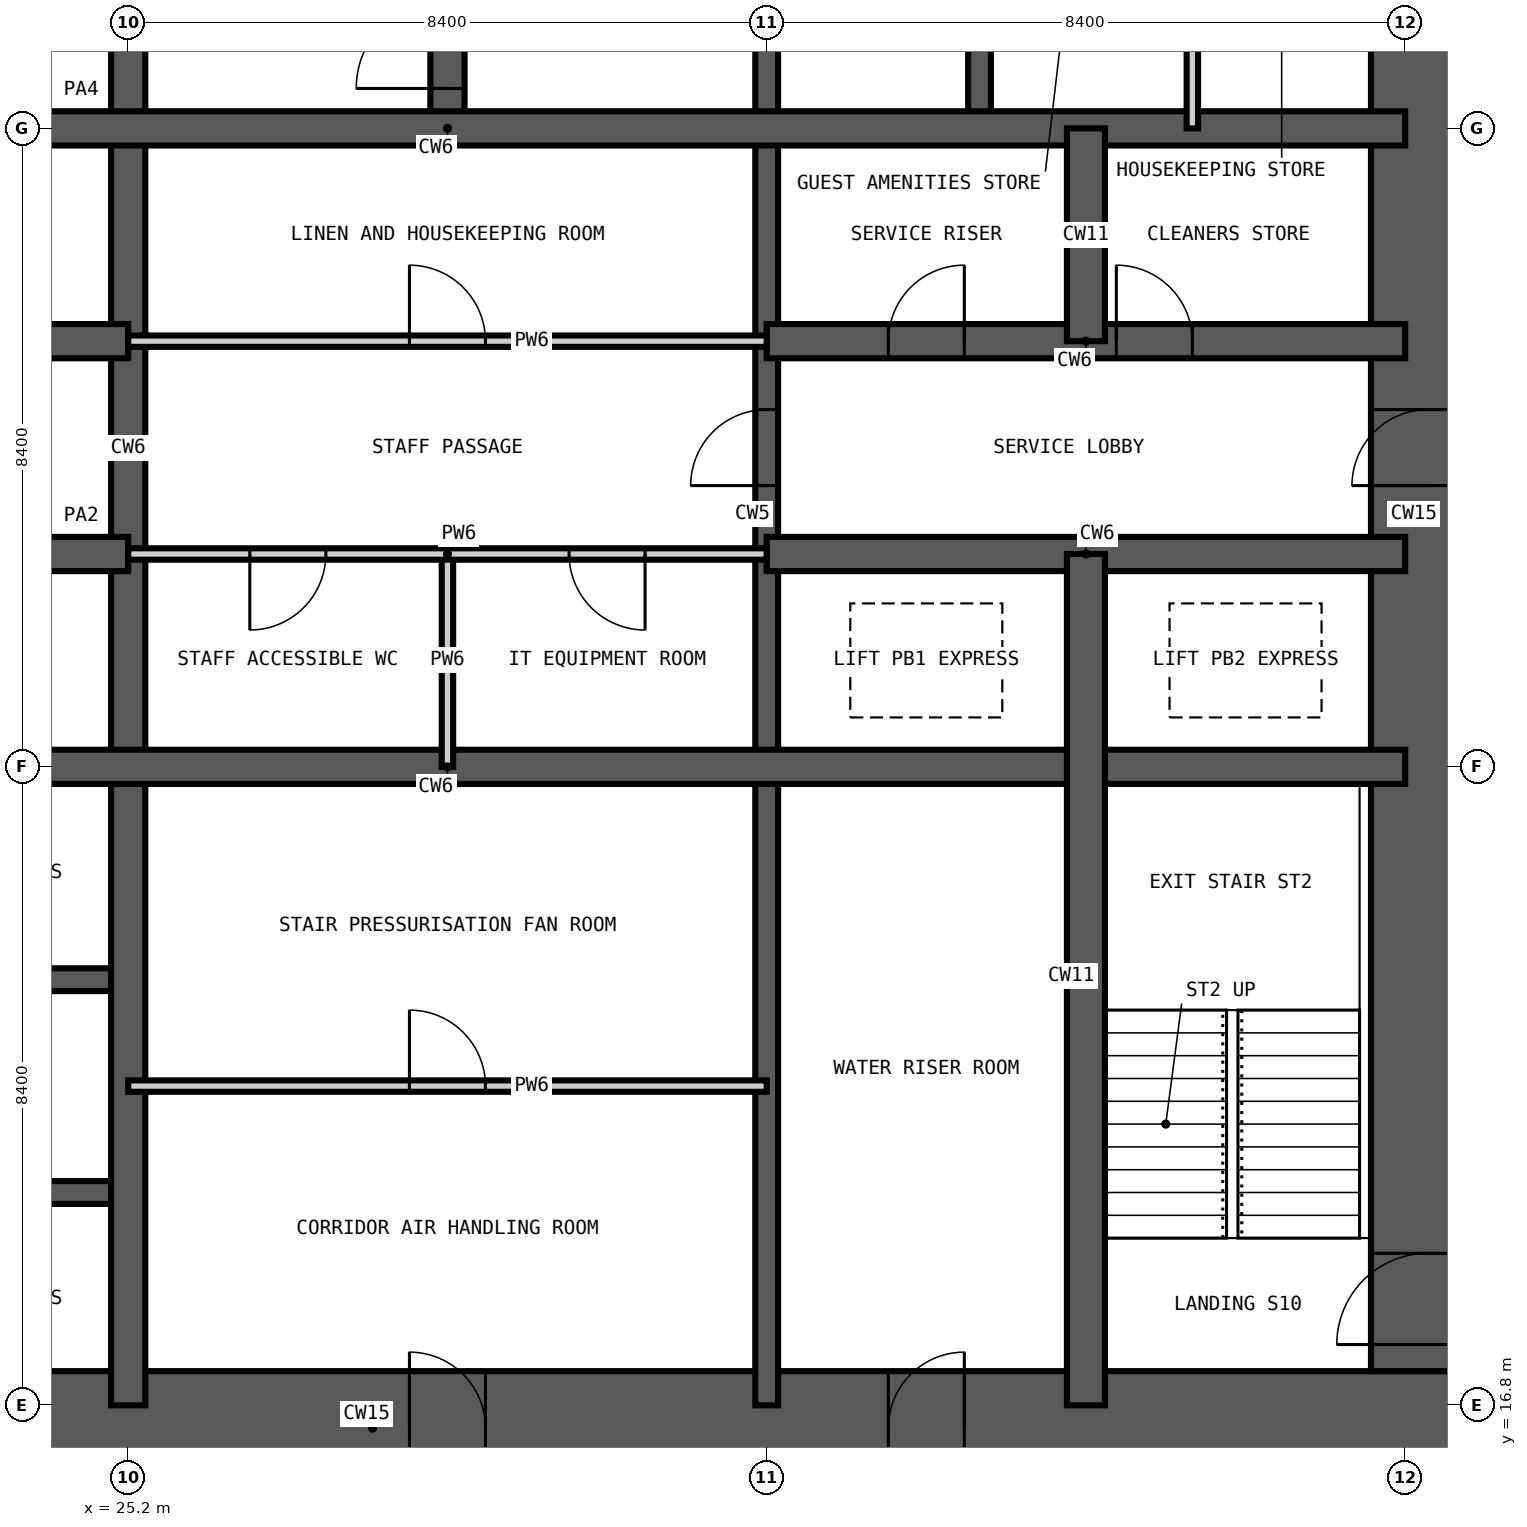
"""IFC4 building model, lengths in metres.
Left out: names, types, materials, properties, quantities, classifications, styles, units other than length and angle.
Written with IfcOpenShell. Run it as: python <this file> out.ifc"""

import sys

from ifc_helpers import new_model, si_unit, direction, frame, frame_2d, origin, place, context, subcontext, project, spatial, rectangle, extrude, element, fill, save


model = new_model("IFC4")
c1 = context("Model", 3, precision=1e-05, world=origin(), true_north=direction((0.0, 1.0)))
c2 = subcontext(c1, "Body", "Model", "MODEL_VIEW")
j1 = project(units=[si_unit("LENGTHUNIT", "METRE"), si_unit("PLANEANGLEUNIT", "RADIAN")], contexts=[c1])
p1 = place(None, origin())
s1 = spatial("IfcSite", under=j1, at=p1, CompositionType="ELEMENT")
p2 = place(p1, origin())
s2 = spatial("IfcBuilding", under=s1, at=p2, CompositionType="ELEMENT")
p3 = place(p2, frame((0.0, 0.0, 70.2)))
s3 = spatial("IfcBuildingStorey", under=s2, at=p3, CompositionType="ELEMENT", Elevation=70.2)
p4 = place(p3, frame((15.75, 16.5, -0.35), z_axis=(0.0, 0.0, 1.0), x_axis=(1.0, 0.0, 0.0)))
e1 = element("IfcWall", 1, at=p4, inside=s3, PredefinedType="SHEAR", context=c2, shape_type="SweptSolid", body=[
    extrude(rectangle(XDim=27.3, YDim=1.5, at=frame_2d((13.65, 0.0))), origin(), (0.0, 0.0, 1.0), 3.6),
])
p5 = place(p4, frame((13.15, 0.0, 0.35)))
e2 = element("IfcOpeningElement", 2, at=p5, cuts=e1, PredefinedType="OPENING", context=c2, shape_type="SweptSolid", body=[
    extrude(rectangle(XDim=1.0, YDim=2.1, at=frame_2d((0.5, 1.05))), frame((0.0, 0.76, 0.0), z_axis=(0.0, -1.0, 0.0), x_axis=(1.0, 0.0, 0.0)), (0.0, 0.0, 1.0), 1.52),
])
p6 = place(p4, frame((19.45, 0.0, 0.35)))
e3 = element("IfcOpeningElement", 3, at=p6, cuts=e1, PredefinedType="OPENING", context=c2, shape_type="SweptSolid", body=[
    extrude(rectangle(XDim=1.0, YDim=2.1, at=frame_2d((0.5, 1.05))), frame((0.0, 0.76, 0.0), z_axis=(0.0, -1.0, 0.0), x_axis=(1.0, 0.0, 0.0)), (0.0, 0.0, 1.0), 1.52),
])
p7 = place(p3, frame((42.3, 17.25, -0.35), z_axis=(0.0, 0.0, 1.0), x_axis=(0.0, 1.0, 0.0)))
e4 = element("IfcWall", 4, at=p7, inside=s3, PredefinedType="SHEAR", context=c2, shape_type="SweptSolid", body=[
    extrude(rectangle(XDim=24.3, YDim=1.5, at=frame_2d((12.15, 0.0))), origin(), (0.0, 0.0, 1.0), 3.6),
])
p8 = place(p7, frame((0.35, 0.0, 0.35)))
e5 = element("IfcOpeningElement", 5, at=p8, cuts=e4, PredefinedType="OPENING", context=c2, shape_type="SweptSolid", body=[
    extrude(rectangle(XDim=1.2, YDim=2.2, at=frame_2d((0.6, 1.1))), frame((0.0, 0.76, 0.0), z_axis=(0.0, -1.0, 0.0), x_axis=(1.0, 0.0, 0.0)), (0.0, 0.0, 1.0), 1.52),
])
p9 = place(p7, frame((11.65, 0.0, 0.35)))
e6 = element("IfcOpeningElement", 6, at=p9, cuts=e4, PredefinedType="OPENING", context=c2, shape_type="SweptSolid", body=[
    extrude(rectangle(XDim=1.0, YDim=2.1, at=frame_2d((0.5, 1.05))), frame((0.0, 0.76, 0.0), z_axis=(0.0, -1.0, 0.0), x_axis=(1.0, 0.0, 0.0)), (0.0, 0.0, 1.0), 1.52),
])
p10 = place(p7, frame((20.05, 0.0, 0.35)))
e7 = element("IfcOpeningElement", 7, at=p10, cuts=e4, PredefinedType="OPENING", context=c2, shape_type="SweptSolid", body=[
    extrude(rectangle(XDim=1.0, YDim=2.1, at=frame_2d((0.5, 1.05))), frame((0.0, 0.76, 0.0), z_axis=(0.0, -1.0, 0.0), x_axis=(1.0, 0.0, 0.0)), (0.0, 0.0, 1.0), 1.52),
])
p11 = place(p3, frame((33.6, 16.8, -0.35), z_axis=(0.0, 0.0, 1.0), x_axis=(0.0, 1.0, 0.0)))
e8 = element("IfcWall", 8, at=p11, inside=s3, PredefinedType="SHEAR", context=c2, shape_type="SweptSolid", body=[
    extrude(rectangle(XDim=25.2, YDim=0.3, at=frame_2d((12.6, 0.0))), origin(), (0.0, 0.0, 1.0), 3.6),
])
p12 = place(p11, frame((22.5, 0.0, 0.35)))
e9 = element("IfcOpeningElement", 9, at=p12, cuts=e8, PredefinedType="OPENING", context=c2, shape_type="SweptSolid", body=[
    extrude(rectangle(XDim=1.2, YDim=2.2, at=frame_2d((0.6, 1.1))), frame((0.0, 0.16, 0.0), z_axis=(0.0, -1.0, 0.0), x_axis=(1.0, 0.0, 0.0)), (0.0, 0.0, 1.0), 0.32),
])
p13 = place(p11, frame((18.3, 0.0, 0.35)))
e10 = element("IfcOpeningElement", 10, at=p13, cuts=e8, PredefinedType="OPENING", context=c2, shape_type="SweptSolid", body=[
    extrude(rectangle(XDim=1.2, YDim=2.2, at=frame_2d((0.6, 1.1))), frame((0.0, 0.16, 0.0), z_axis=(0.0, -1.0, 0.0), x_axis=(1.0, 0.0, 0.0)), (0.0, 0.0, 1.0), 0.32),
])
p14 = place(p11, frame((12.1, 0.0, 0.35)))
e11 = element("IfcOpeningElement", 11, at=p14, cuts=e8, PredefinedType="OPENING", context=c2, shape_type="SweptSolid", body=[
    extrude(rectangle(XDim=1.0, YDim=2.1, at=frame_2d((0.5, 1.05))), frame((0.0, 0.16, 0.0), z_axis=(0.0, -1.0, 0.0), x_axis=(1.0, 0.0, 0.0)), (0.0, 0.0, 1.0), 0.32),
])
for number, where, z_axis, x_axis in (
    (12, (36.4, 33.6, -0.35), (0.0, 0.0, 1.0), (0.0, 1.0, 0.0)),
    (13, (16.8, 19.6, -0.35), (0.0, 0.0, 1.0), (1.0, 0.0, 0.0)),
    (14, (16.8, 22.4, -0.35), (0.0, 0.0, 1.0), (1.0, 0.0, 0.0)),
):
    element("IfcWall", number, at=place(p3, frame(where, z_axis=z_axis, x_axis=x_axis)), inside=s3, PredefinedType="SHEAR", context=c2, shape_type="SweptSolid", body=[
        extrude(rectangle(XDim=8.4, YDim=0.3, at=frame_2d((4.2, 0.0))), origin(), (0.0, 0.0, 1.0), 3.6),
    ])
p15 = place(p3, frame((25.2, 16.8, -0.35), z_axis=(0.0, 0.0, 1.0), x_axis=(0.0, 1.0, 0.0)))
e15 = element("IfcWall", 15, at=p15, inside=s3, PredefinedType="SHEAR", context=c2, shape_type="SweptSolid", body=[
    extrude(rectangle(XDim=25.2, YDim=0.45, at=frame_2d((12.6, 0.0))), origin(), (0.0, 0.0, 1.0), 3.6),
])
p16 = place(p3, frame((29.4, 33.6, -0.35), z_axis=(0.0, 0.0, 1.0), x_axis=(0.0, 1.0, 0.0)))
e16 = element("IfcWall", 16, at=p16, inside=s3, PredefinedType="SHEAR", context=c2, shape_type="SweptSolid", body=[
    extrude(rectangle(XDim=8.4, YDim=0.45, at=frame_2d((4.2, 0.0))), origin(), (0.0, 0.0, 1.0), 3.6),
])
p17 = place(p16, frame((0.525, 0.0, 0.35)))
e17 = element("IfcOpeningElement", 17, at=p17, cuts=e16, PredefinedType="OPENING", context=c2, shape_type="SweptSolid", body=[
    extrude(rectangle(XDim=1.2, YDim=2.2, at=frame_2d((0.6, 1.1))), frame((0.0, 0.235, 0.0), z_axis=(0.0, -1.0, 0.0), x_axis=(1.0, 0.0, 0.0)), (0.0, 0.0, 1.0), 0.47),
])
p18 = place(p3, frame((16.8, 25.2, -0.35), z_axis=(0.0, 0.0, 1.0), x_axis=(1.0, 0.0, 0.0)))
e18 = element("IfcWall", 18, at=p18, inside=s3, PredefinedType="SHEAR", context=c2, shape_type="SweptSolid", body=[
    extrude(rectangle(XDim=25.2, YDim=0.45, at=frame_2d((12.6, 0.0))), origin(), (0.0, 0.0, 1.0), 3.6),
])
p19 = place(p3, frame((16.8, 28.0, -0.35), z_axis=(0.0, 0.0, 1.0), x_axis=(1.0, 0.0, 0.0)))
e19 = element("IfcWall", 19, at=p19, inside=s3, PredefinedType="SHEAR", context=c2, shape_type="SweptSolid", body=[
    extrude(rectangle(XDim=8.4, YDim=0.45, at=frame_2d((4.2, 0.0))), origin(), (0.0, 0.0, 1.0), 3.6),
])
p20 = place(p19, frame((1.55, 0.0, 0.35)))
e20 = element("IfcOpeningElement", 20, at=p20, cuts=e19, PredefinedType="OPENING", context=c2, shape_type="SweptSolid", body=[
    extrude(rectangle(XDim=1.1, YDim=2.2, at=frame_2d((0.55, 1.1))), frame((0.0, 0.235, 0.0), z_axis=(0.0, -1.0, 0.0), x_axis=(1.0, 0.0, 0.0)), (0.0, 0.0, 1.0), 0.47),
])
p21 = place(p19, frame((5.75, 0.0, 0.35)))
e21 = element("IfcOpeningElement", 21, at=p21, cuts=e19, PredefinedType="OPENING", context=c2, shape_type="SweptSolid", body=[
    extrude(rectangle(XDim=1.1, YDim=2.2, at=frame_2d((0.55, 1.1))), frame((0.0, 0.235, 0.0), z_axis=(0.0, -1.0, 0.0), x_axis=(1.0, 0.0, 0.0)), (0.0, 0.0, 1.0), 0.47),
])
p22 = place(p3, frame((33.6, 28.0, -0.35), z_axis=(0.0, 0.0, 1.0), x_axis=(1.0, 0.0, 0.0)))
e22 = element("IfcWall", 22, at=p22, inside=s3, PredefinedType="SHEAR", context=c2, shape_type="SweptSolid", body=[
    extrude(rectangle(XDim=8.4, YDim=0.45, at=frame_2d((4.2, 0.0))), origin(), (0.0, 0.0, 1.0), 3.6),
])
p23 = place(p3, frame((16.8, 30.8, -0.35), z_axis=(0.0, 0.0, 1.0), x_axis=(1.0, 0.0, 0.0)))
e23 = element("IfcWall", 23, at=p23, inside=s3, PredefinedType="SHEAR", context=c2, shape_type="SweptSolid", body=[
    extrude(rectangle(XDim=8.4, YDim=0.45, at=frame_2d((4.2, 0.0))), origin(), (0.0, 0.0, 1.0), 3.6),
])
p24 = place(p23, frame((1.55, 0.0, 0.35)))
e24 = element("IfcOpeningElement", 24, at=p24, cuts=e23, PredefinedType="OPENING", context=c2, shape_type="SweptSolid", body=[
    extrude(rectangle(XDim=1.1, YDim=2.2, at=frame_2d((0.55, 1.1))), frame((0.0, 0.235, 0.0), z_axis=(0.0, -1.0, 0.0), x_axis=(1.0, 0.0, 0.0)), (0.0, 0.0, 1.0), 0.47),
])
p25 = place(p23, frame((5.75, 0.0, 0.35)))
e25 = element("IfcOpeningElement", 25, at=p25, cuts=e23, PredefinedType="OPENING", context=c2, shape_type="SweptSolid", body=[
    extrude(rectangle(XDim=1.1, YDim=2.2, at=frame_2d((0.55, 1.1))), frame((0.0, 0.235, 0.0), z_axis=(0.0, -1.0, 0.0), x_axis=(1.0, 0.0, 0.0)), (0.0, 0.0, 1.0), 0.47),
])
p26 = place(p3, frame((33.6, 30.8, -0.35), z_axis=(0.0, 0.0, 1.0), x_axis=(1.0, 0.0, 0.0)))
e26 = element("IfcWall", 26, at=p26, inside=s3, PredefinedType="SHEAR", context=c2, shape_type="SweptSolid", body=[
    extrude(rectangle(XDim=8.4, YDim=0.45, at=frame_2d((4.2, 0.0))), origin(), (0.0, 0.0, 1.0), 3.6),
])
p27 = place(p26, frame((1.6, 0.0, 0.35)))
e27 = element("IfcOpeningElement", 27, at=p27, cuts=e26, PredefinedType="OPENING", context=c2, shape_type="SweptSolid", body=[
    extrude(rectangle(XDim=1.0, YDim=2.1, at=frame_2d((0.5, 1.05))), frame((0.0, 0.235, 0.0), z_axis=(0.0, -1.0, 0.0), x_axis=(1.0, 0.0, 0.0)), (0.0, 0.0, 1.0), 0.47),
])
p28 = place(p26, frame((4.6, 0.0, 0.35)))
e28 = element("IfcOpeningElement", 28, at=p28, cuts=e26, PredefinedType="OPENING", context=c2, shape_type="SweptSolid", body=[
    extrude(rectangle(XDim=1.0, YDim=2.1, at=frame_2d((0.5, 1.05))), frame((0.0, 0.235, 0.0), z_axis=(0.0, -1.0, 0.0), x_axis=(1.0, 0.0, 0.0)), (0.0, 0.0, 1.0), 0.47),
])
p29 = place(p3, frame((16.8, 33.6, -0.35), z_axis=(0.0, 0.0, 1.0), x_axis=(1.0, 0.0, 0.0)))
e29 = element("IfcWall", 29, at=p29, inside=s3, PredefinedType="SHEAR", context=c2, shape_type="SweptSolid", body=[
    extrude(rectangle(XDim=25.2, YDim=0.45, at=frame_2d((12.6, 0.0))), origin(), (0.0, 0.0, 1.0), 3.6),
])
p30 = place(p3, frame((37.8, 16.8, -0.35), z_axis=(0.0, 0.0, 1.0), x_axis=(0.0, 1.0, 0.0)))
e30 = element("IfcWall", 30, at=p30, inside=s3, PredefinedType="SHEAR", context=c2, shape_type="SweptSolid", body=[
    extrude(rectangle(XDim=11.2, YDim=0.5, at=frame_2d((5.6, 0.0))), origin(), (0.0, 0.0, 1.0), 3.6),
])
p31 = place(p3, frame((37.8, 30.8, -0.35), z_axis=(0.0, 0.0, 1.0), x_axis=(0.0, 1.0, 0.0)))
e31 = element("IfcWall", 31, at=p31, inside=s3, PredefinedType="SHEAR", context=c2, shape_type="SweptSolid", body=[
    extrude(rectangle(XDim=2.8, YDim=0.5, at=frame_2d((1.4, 0.0))), origin(), (0.0, 0.0, 1.0), 3.6),
])
p32 = place(p3, frame((29.4, 25.2, 0.0), z_axis=(0.0, 0.0, 1.0), x_axis=(0.0, 1.0, 0.0)))
e32 = element("IfcWall", 32, at=p32, inside=s3, PredefinedType="PARTITIONING", context=c2, shape_type="SweptSolid", body=[
    extrude(rectangle(XDim=2.8, YDim=0.15, at=frame_2d((1.4, 0.0))), origin(), (0.0, 0.0, 1.0), 3.25),
])
p33 = place(p3, frame((39.2, 33.6, 0.0), z_axis=(0.0, 0.0, 1.0), x_axis=(0.0, 1.0, 0.0)))
e33 = element("IfcWall", 33, at=p33, inside=s3, PredefinedType="PARTITIONING", context=c2, shape_type="SweptSolid", body=[
    extrude(rectangle(XDim=8.4, YDim=0.15, at=frame_2d((4.2, 0.0))), origin(), (0.0, 0.0, 1.0), 3.25),
])
p34 = place(p33, frame((3.7, 0.0, 0.0)))
e34 = element("IfcOpeningElement", 34, at=p34, cuts=e33, PredefinedType="OPENING", context=c2, shape_type="SweptSolid", body=[
    extrude(rectangle(XDim=1.0, YDim=2.1, at=frame_2d((0.5, 1.05))), frame((0.0, 0.085, 0.0), z_axis=(0.0, -1.0, 0.0), x_axis=(1.0, 0.0, 0.0)), (0.0, 0.0, 1.0), 0.17),
])
p35 = place(p3, frame((25.2, 21.0, 0.0), z_axis=(0.0, 0.0, 1.0), x_axis=(1.0, 0.0, 0.0)))
e35 = element("IfcWall", 35, at=p35, inside=s3, PredefinedType="PARTITIONING", context=c2, shape_type="SweptSolid", body=[
    extrude(rectangle(XDim=8.4, YDim=0.15, at=frame_2d((4.2, 0.0))), origin(), (0.0, 0.0, 1.0), 3.25),
])
p36 = place(p35, frame((3.7, 0.0, 0.0)))
e36 = element("IfcOpeningElement", 36, at=p36, cuts=e35, PredefinedType="OPENING", context=c2, shape_type="SweptSolid", body=[
    extrude(rectangle(XDim=1.0, YDim=2.1, at=frame_2d((0.5, 1.05))), frame((0.0, 0.085, 0.0), z_axis=(0.0, -1.0, 0.0), x_axis=(1.0, 0.0, 0.0)), (0.0, 0.0, 1.0), 0.17),
])
p37 = place(p3, frame((25.2, 28.0, 0.0), z_axis=(0.0, 0.0, 1.0), x_axis=(1.0, 0.0, 0.0)))
e37 = element("IfcWall", 37, at=p37, inside=s3, PredefinedType="PARTITIONING", context=c2, shape_type="SweptSolid", body=[
    extrude(rectangle(XDim=8.4, YDim=0.15, at=frame_2d((4.2, 0.0))), origin(), (0.0, 0.0, 1.0), 3.25),
])
p38 = place(p37, frame((5.8, 0.0, 0.0)))
e38 = element("IfcOpeningElement", 38, at=p38, cuts=e37, PredefinedType="OPENING", context=c2, shape_type="SweptSolid", body=[
    extrude(rectangle(XDim=1.0, YDim=2.1, at=frame_2d((0.5, 1.05))), frame((0.0, 0.085, 0.0), z_axis=(0.0, -1.0, 0.0), x_axis=(1.0, 0.0, 0.0)), (0.0, 0.0, 1.0), 0.17),
])
p39 = place(p37, frame((1.6, 0.0, 0.0)))
e39 = element("IfcOpeningElement", 39, at=p39, cuts=e37, PredefinedType="OPENING", context=c2, shape_type="SweptSolid", body=[
    extrude(rectangle(XDim=1.0, YDim=2.1, at=frame_2d((0.5, 1.05))), frame((0.0, 0.085, 0.0), z_axis=(0.0, -1.0, 0.0), x_axis=(1.0, 0.0, 0.0)), (0.0, 0.0, 1.0), 0.17),
])
p40 = place(p3, frame((25.2, 30.8, 0.0), z_axis=(0.0, 0.0, 1.0), x_axis=(1.0, 0.0, 0.0)))
e40 = element("IfcWall", 40, at=p40, inside=s3, PredefinedType="PARTITIONING", context=c2, shape_type="SweptSolid", body=[
    extrude(rectangle(XDim=8.4, YDim=0.15, at=frame_2d((4.2, 0.0))), origin(), (0.0, 0.0, 1.0), 3.25),
])
p41 = place(p40, frame((3.7, 0.0, 0.0)))
e41 = element("IfcOpeningElement", 41, at=p41, cuts=e40, PredefinedType="OPENING", context=c2, shape_type="SweptSolid", body=[
    extrude(rectangle(XDim=1.0, YDim=2.1, at=frame_2d((0.5, 1.05))), frame((0.0, 0.085, 0.0), z_axis=(0.0, -1.0, 0.0), x_axis=(1.0, 0.0, 0.0)), (0.0, 0.0, 1.0), 0.17),
])
p42 = place(p17, origin())
e42 = element("IfcDoor", 42, at=p42, inside=s3, OperationType="SINGLE_SWING_LEFT", PredefinedType="DOOR", context=c2, shape_type="SweptSolid", body=[
    extrude(rectangle(XDim=1.2, YDim=2.2, at=frame_2d((0.6, 1.1))), frame((0.0, 0.025, 0.0), z_axis=(0.0, -1.0, 0.0), x_axis=(1.0, 0.0, 0.0)), (0.0, 0.0, 1.0), 0.05),
])
fill(e17, e42)
p43 = place(p8, origin())
e43 = element("IfcDoor", 43, at=p43, inside=s3, OperationType="SINGLE_SWING_LEFT", PredefinedType="DOOR", context=c2, shape_type="SweptSolid", body=[
    extrude(rectangle(XDim=1.2, YDim=2.2, at=frame_2d((0.6, 1.1))), frame((0.0, 0.025, 0.0), z_axis=(0.0, -1.0, 0.0), x_axis=(1.0, 0.0, 0.0)), (0.0, 0.0, 1.0), 0.05),
])
fill(e5, e43)
p44 = place(p14, origin())
e44 = element("IfcDoor", 44, at=p44, inside=s3, OperationType="SINGLE_SWING_LEFT", PredefinedType="DOOR", context=c2, shape_type="SweptSolid", body=[
    extrude(rectangle(XDim=1.0, YDim=2.1, at=frame_2d((0.5, 1.05))), frame((0.0, 0.025, 0.0), z_axis=(0.0, -1.0, 0.0), x_axis=(1.0, 0.0, 0.0)), (0.0, 0.0, 1.0), 0.05),
])
fill(e11, e44)
p45 = place(p38, frame((1.0, 0.0, 0.0), z_axis=(0.0, 0.0, 1.0), x_axis=(-1.0, 0.0, 0.0)))
e45 = element("IfcDoor", 45, at=p45, inside=s3, OperationType="SINGLE_SWING_LEFT", PredefinedType="DOOR", context=c2, shape_type="SweptSolid", body=[
    extrude(rectangle(XDim=1.0, YDim=2.1, at=frame_2d((0.5, 1.05))), frame((0.0, 0.025, 0.0), z_axis=(0.0, -1.0, 0.0), x_axis=(1.0, 0.0, 0.0)), (0.0, 0.0, 1.0), 0.05),
])
fill(e38, e45)
p46 = place(p39, frame((1.0, 0.0, 0.0), z_axis=(0.0, 0.0, 1.0), x_axis=(-1.0, 0.0, 0.0)))
e46 = element("IfcDoor", 46, at=p46, inside=s3, OperationType="SINGLE_SWING_RIGHT", PredefinedType="DOOR", context=c2, shape_type="SweptSolid", body=[
    extrude(rectangle(XDim=1.0, YDim=2.1, at=frame_2d((0.5, 1.05))), frame((0.0, 0.025, 0.0), z_axis=(0.0, -1.0, 0.0), x_axis=(1.0, 0.0, 0.0)), (0.0, 0.0, 1.0), 0.05),
])
fill(e39, e46)
p47 = place(p41, origin())
e47 = element("IfcDoor", 47, at=p47, inside=s3, OperationType="SINGLE_SWING_LEFT", PredefinedType="DOOR", context=c2, shape_type="SweptSolid", body=[
    extrude(rectangle(XDim=1.0, YDim=2.1, at=frame_2d((0.5, 1.05))), frame((0.0, 0.025, 0.0), z_axis=(0.0, -1.0, 0.0), x_axis=(1.0, 0.0, 0.0)), (0.0, 0.0, 1.0), 0.05),
])
fill(e41, e47)
p48 = place(p27, origin())
e48 = element("IfcDoor", 48, at=p48, inside=s3, OperationType="SINGLE_SWING_RIGHT", PredefinedType="DOOR", context=c2, shape_type="SweptSolid", body=[
    extrude(rectangle(XDim=1.0, YDim=2.1, at=frame_2d((0.5, 1.05))), frame((0.0, 0.025, 0.0), z_axis=(0.0, -1.0, 0.0), x_axis=(1.0, 0.0, 0.0)), (0.0, 0.0, 1.0), 0.05),
])
fill(e27, e48)
p49 = place(p28, origin())
e49 = element("IfcDoor", 49, at=p49, inside=s3, OperationType="SINGLE_SWING_LEFT", PredefinedType="DOOR", context=c2, shape_type="SweptSolid", body=[
    extrude(rectangle(XDim=1.0, YDim=2.1, at=frame_2d((0.5, 1.05))), frame((0.0, 0.025, 0.0), z_axis=(0.0, -1.0, 0.0), x_axis=(1.0, 0.0, 0.0)), (0.0, 0.0, 1.0), 0.05),
])
fill(e28, e49)
p50 = place(p9, origin())
e50 = element("IfcDoor", 50, at=p50, inside=s3, OperationType="SINGLE_SWING_LEFT", PredefinedType="DOOR", context=c2, shape_type="SweptSolid", body=[
    extrude(rectangle(XDim=1.0, YDim=2.1, at=frame_2d((0.5, 1.05))), frame((0.0, 0.025, 0.0), z_axis=(0.0, -1.0, 0.0), x_axis=(1.0, 0.0, 0.0)), (0.0, 0.0, 1.0), 0.05),
])
fill(e6, e50)
p51 = place(p5, origin())
e51 = element("IfcDoor", 51, at=p51, inside=s3, OperationType="SINGLE_SWING_LEFT", PredefinedType="DOOR", context=c2, shape_type="SweptSolid", body=[
    extrude(rectangle(XDim=1.0, YDim=2.1, at=frame_2d((0.5, 1.05))), frame((0.0, 0.025, 0.0), z_axis=(0.0, -1.0, 0.0), x_axis=(1.0, 0.0, 0.0)), (0.0, 0.0, 1.0), 0.05),
])
fill(e2, e51)
p52 = place(p36, origin())
e52 = element("IfcDoor", 52, at=p52, inside=s3, OperationType="SINGLE_SWING_LEFT", PredefinedType="DOOR", context=c2, shape_type="SweptSolid", body=[
    extrude(rectangle(XDim=1.0, YDim=2.1, at=frame_2d((0.5, 1.05))), frame((0.0, 0.025, 0.0), z_axis=(0.0, -1.0, 0.0), x_axis=(1.0, 0.0, 0.0)), (0.0, 0.0, 1.0), 0.05),
])
fill(e36, e52)
p53 = place(p6, origin())
e53 = element("IfcDoor", 53, at=p53, inside=s3, OperationType="SINGLE_SWING_RIGHT", PredefinedType="DOOR", context=c2, shape_type="SweptSolid", body=[
    extrude(rectangle(XDim=1.0, YDim=2.1, at=frame_2d((0.5, 1.05))), frame((0.0, 0.025, 0.0), z_axis=(0.0, -1.0, 0.0), x_axis=(1.0, 0.0, 0.0)), (0.0, 0.0, 1.0), 0.05),
])
fill(e3, e53)
save(model, sys.argv[1])
